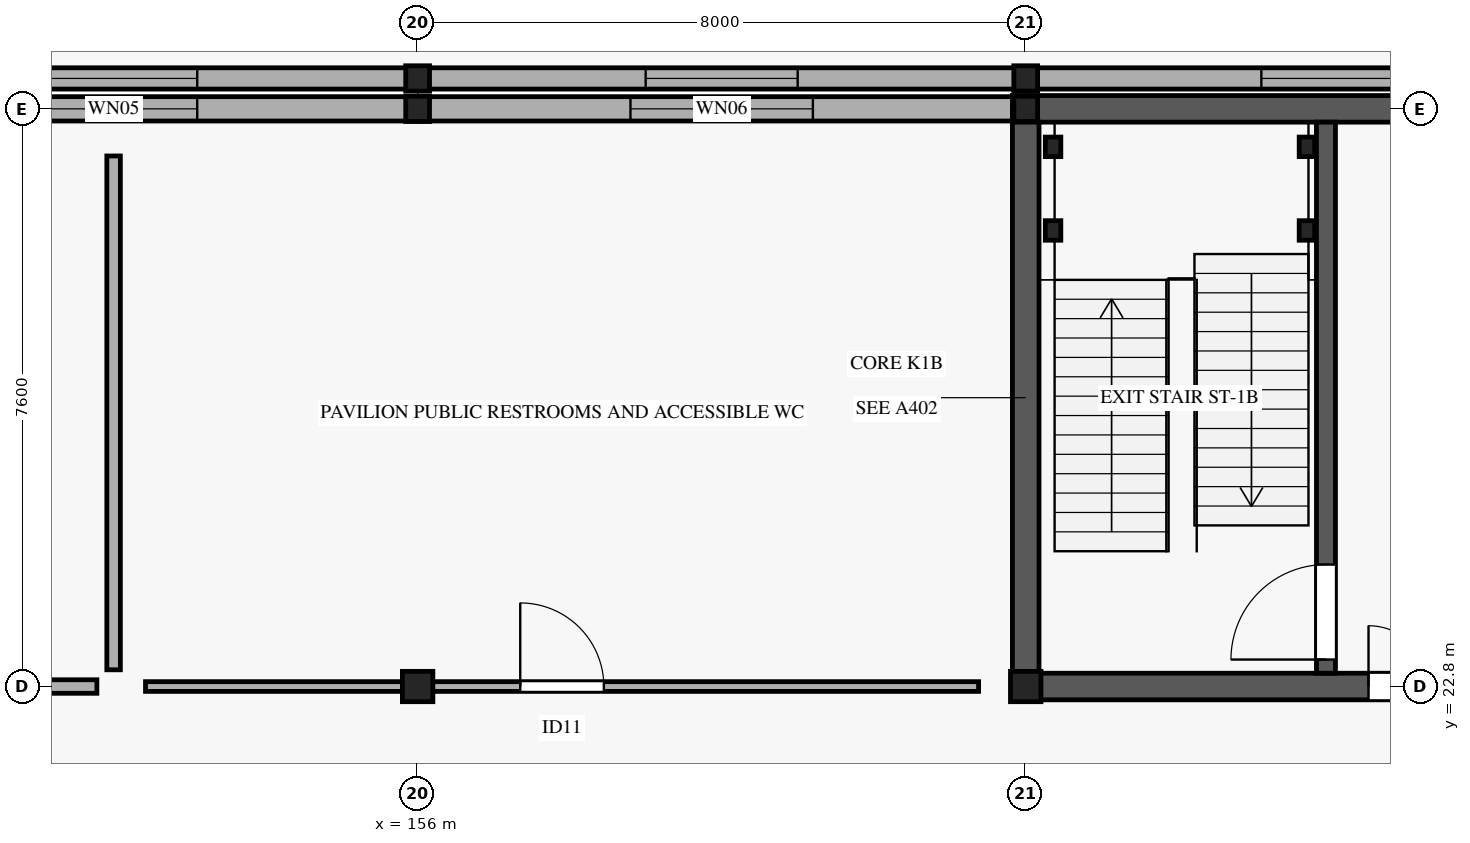
"""IFC4 building model, lengths in metres.
Left out: names, types, materials, properties, quantities, classifications, styles, units other than length and angle.
Written with IfcOpenShell. Run it as: python <this file> out.ifc"""

import sys

from ifc_helpers import new_model, si_unit, direction, frame, frame_2d, origin, origin_2d, place, context, subcontext, project, spatial, rectangle, i_section, extrude, element, fill, save


model = new_model("IFC4")
c1 = context("Model", 3, precision=1e-05, world=origin(), true_north=direction((0.0, 1.0)))
c2 = subcontext(c1, "Body", "Model", "MODEL_VIEW")
j1 = project(units=[si_unit("LENGTHUNIT", "METRE"), si_unit("PLANEANGLEUNIT", "RADIAN")], contexts=[c1])
p1 = place(None, origin())
s1 = spatial("IfcSite", under=j1, at=p1, CompositionType="ELEMENT")
p2 = place(p1, origin())
s2 = spatial("IfcBuilding", under=s1, at=p2, CompositionType="ELEMENT")
p3 = place(p2, origin())
s3 = spatial("IfcBuildingStorey", under=s2, at=p3, CompositionType="ELEMENT", Elevation=0.0)
p4 = place(p3, frame((156.0, 22.8, 0.0), z_axis=(0.0, 0.0, 1.0), x_axis=(1.0, 0.0, 0.0)))
e1 = element("IfcColumn", 1, at=p4, inside=s3, PredefinedType="COLUMN", context=c2, shape_type="SweptSolid", body=[
    extrude(i_section(OverallWidth=0.401, OverallDepth=0.399, WebThickness=0.025, FlangeThickness=0.04, FilletRadius=0.015, at=origin_2d()), origin(), (0.0, 0.0, 1.0), 5.185),
])
p5 = place(p3, frame((156.0, 30.4, 0.0), z_axis=(0.0, 0.0, 1.0), x_axis=(1.0, 0.0, 0.0)))
e2 = element("IfcColumn", 2, at=p5, inside=s3, PredefinedType="COLUMN", context=c2, shape_type="SweptSolid", body=[
    extrude(i_section(OverallWidth=0.313, OverallDepth=0.333, WebThickness=0.018, FlangeThickness=0.028, FilletRadius=0.015, at=origin_2d()), origin(), (0.0, 0.0, 1.0), 5.185),
])
p6 = place(p3, frame((164.0, 22.8, 0.0), z_axis=(0.0, 0.0, 1.0), x_axis=(1.0, 0.0, 0.0)))
e3 = element("IfcColumn", 3, at=p6, inside=s3, PredefinedType="COLUMN", context=c2, shape_type="SweptSolid", body=[
    extrude(i_section(OverallWidth=0.401, OverallDepth=0.399, WebThickness=0.025, FlangeThickness=0.04, FilletRadius=0.015, at=origin_2d()), origin(), (0.0, 0.0, 1.0), 5.185),
])
for number, where, z_axis, x_axis in (
    (4, (164.0, 30.4, 0.0), (0.0, 0.0, 1.0), (1.0, 0.0, 0.0)),
    (5, (156.0, 30.8, 0.0), (0.0, 0.0, 1.0), (1.0, 0.0, 0.0)),
    (6, (164.0, 30.8, 0.0), (0.0, 0.0, 1.0), (1.0, 0.0, 0.0)),
):
    element("IfcColumn", number, at=place(p3, frame(where, z_axis=z_axis, x_axis=x_axis)), inside=s3, PredefinedType="COLUMN", context=c2, shape_type="SweptSolid", body=[
        extrude(i_section(OverallWidth=0.313, OverallDepth=0.333, WebThickness=0.018, FlangeThickness=0.028, FilletRadius=0.015, at=origin_2d()), origin(), (0.0, 0.0, 1.0), 5.185),
    ])
p7 = place(p3, frame((147.98, 30.4, 0.0), z_axis=(0.0, 0.0, 1.0), x_axis=(1.0, 0.0, 0.0)))
e7 = element("IfcWall", 7, at=p7, inside=s3, PredefinedType="STANDARD", context=c2, shape_type="SweptSolid", body=[
    extrude(rectangle(XDim=8.04, YDim=0.32, at=frame_2d((4.02, 0.0))), origin(), (0.0, 0.0, 1.0), 4.25),
])
p8 = place(p7, frame((2.92, 0.0, 0.75)))
e8 = element("IfcOpeningElement", 8, at=p8, cuts=e7, PredefinedType="OPENING", context=c2, shape_type="SweptSolid", body=[
    extrude(rectangle(XDim=2.2, YDim=2.0, at=frame_2d((1.1, 1.0))), frame((0.0, 0.17, 0.0), z_axis=(0.0, -1.0, 0.0), x_axis=(1.0, 0.0, 0.0)), (0.0, 0.0, 1.0), 0.34),
])
p9 = place(p3, frame((155.98, 30.4, 0.0), z_axis=(0.0, 0.0, 1.0), x_axis=(1.0, 0.0, 0.0)))
e9 = element("IfcWall", 9, at=p9, inside=s3, PredefinedType="STANDARD", context=c2, shape_type="SweptSolid", body=[
    extrude(rectangle(XDim=8.04, YDim=0.32, at=frame_2d((4.02, 0.0))), origin(), (0.0, 0.0, 1.0), 4.25),
])
p10 = place(p9, frame((2.82, 0.0, 0.75)))
e10 = element("IfcOpeningElement", 10, at=p10, cuts=e9, PredefinedType="OPENING", context=c2, shape_type="SweptSolid", body=[
    extrude(rectangle(XDim=2.4, YDim=2.0, at=frame_2d((1.2, 1.0))), frame((0.0, 0.17, 0.0), z_axis=(0.0, -1.0, 0.0), x_axis=(1.0, 0.0, 0.0)), (0.0, 0.0, 1.0), 0.34),
])
p11 = place(p3, frame((172.02, 30.8, 0.0), z_axis=(0.0, 0.0, 1.0), x_axis=(-1.0, 0.0, 0.0)))
e11 = element("IfcWall", 11, at=p11, inside=s3, PredefinedType="STANDARD", context=c2, shape_type="SweptSolid", body=[
    extrude(rectangle(XDim=8.04, YDim=0.28, at=frame_2d((4.02, 0.0))), origin(), (0.0, 0.0, 1.0), 4.25),
])
p12 = place(p11, frame((3.12, 0.0, 0.75)))
e12 = element("IfcOpeningElement", 12, at=p12, cuts=e11, PredefinedType="OPENING", context=c2, shape_type="SweptSolid", body=[
    extrude(rectangle(XDim=1.8, YDim=2.0, at=frame_2d((0.9, 1.0))), frame((0.0, 0.15, 0.0), z_axis=(0.0, -1.0, 0.0), x_axis=(1.0, 0.0, 0.0)), (0.0, 0.0, 1.0), 0.3),
])
p13 = place(p3, frame((164.02, 30.8, 0.0), z_axis=(0.0, 0.0, 1.0), x_axis=(-1.0, 0.0, 0.0)))
e13 = element("IfcWall", 13, at=p13, inside=s3, PredefinedType="STANDARD", context=c2, shape_type="SweptSolid", body=[
    extrude(rectangle(XDim=8.04, YDim=0.28, at=frame_2d((4.02, 0.0))), origin(), (0.0, 0.0, 1.0), 4.25),
])
p14 = place(p13, frame((3.02, 0.0, 0.75)))
e14 = element("IfcOpeningElement", 14, at=p14, cuts=e13, PredefinedType="OPENING", context=c2, shape_type="SweptSolid", body=[
    extrude(rectangle(XDim=2.0, YDim=2.0, at=frame_2d((1.0, 1.0))), frame((0.0, 0.15, 0.0), z_axis=(0.0, -1.0, 0.0), x_axis=(1.0, 0.0, 0.0)), (0.0, 0.0, 1.0), 0.3),
])
p15 = place(p3, frame((156.02, 30.8, 0.0), z_axis=(0.0, 0.0, 1.0), x_axis=(-1.0, 0.0, 0.0)))
e15 = element("IfcWall", 15, at=p15, inside=s3, PredefinedType="STANDARD", context=c2, shape_type="SweptSolid", body=[
    extrude(rectangle(XDim=8.04, YDim=0.28, at=frame_2d((4.02, 0.0))), origin(), (0.0, 0.0, 1.0), 4.25),
])
p16 = place(p15, frame((2.92, 0.0, 0.75)))
e16 = element("IfcOpeningElement", 16, at=p16, cuts=e15, PredefinedType="OPENING", context=c2, shape_type="SweptSolid", body=[
    extrude(rectangle(XDim=2.2, YDim=2.0, at=frame_2d((1.1, 1.0))), frame((0.0, 0.15, 0.0), z_axis=(0.0, -1.0, 0.0), x_axis=(1.0, 0.0, 0.0)), (0.0, 0.0, 1.0), 0.3),
])
p17 = place(p3, frame((163.825, 22.8, 0.0), z_axis=(0.0, 0.0, 1.0), x_axis=(1.0, 0.0, 0.0)))
e17 = element("IfcWall", 17, at=p17, inside=s3, PredefinedType="SHEAR", context=c2, shape_type="SweptSolid", body=[
    extrude(rectangle(XDim=8.35, YDim=0.35, at=frame_2d((4.175, 0.0))), origin(), (0.0, 0.0, 1.0), 5.19),
])
p18 = place(p17, frame((4.685, 0.0, 0.0)))
e18 = element("IfcOpeningElement", 18, at=p18, cuts=e17, PredefinedType="OPENING", context=c2, shape_type="SweptSolid", body=[
    extrude(rectangle(XDim=1.6, YDim=2.35, at=frame_2d((0.8, 1.175))), frame((0.0, 0.185, 0.0), z_axis=(0.0, -1.0, 0.0), x_axis=(1.0, 0.0, 0.0)), (0.0, 0.0, 1.0), 0.37),
])
p19 = place(p3, frame((163.825, 30.4, 0.0), z_axis=(0.0, 0.0, 1.0), x_axis=(1.0, 0.0, 0.0)))
e19 = element("IfcWall", 19, at=p19, inside=s3, PredefinedType="SHEAR", context=c2, shape_type="SweptSolid", body=[
    extrude(rectangle(XDim=8.35, YDim=0.35, at=frame_2d((4.175, 0.0))), origin(), (0.0, 0.0, 1.0), 5.19),
])
p20 = place(p3, frame((164.0, 22.975, 0.0), z_axis=(0.0, 0.0, 1.0), x_axis=(0.0, 1.0, 0.0)))
e20 = element("IfcWall", 20, at=p20, inside=s3, PredefinedType="SHEAR", context=c2, shape_type="SweptSolid", body=[
    extrude(rectangle(XDim=7.25, YDim=0.35, at=frame_2d((3.625, 0.0))), origin(), (0.0, 0.0, 1.0), 5.19),
])
p21 = place(p3, frame((167.95, 22.975, 0.0), z_axis=(0.0, 0.0, 1.0), x_axis=(0.0, 1.0, 0.0)))
e21 = element("IfcWall", 21, at=p21, inside=s3, PredefinedType="SHEAR", context=c2, shape_type="SweptSolid", body=[
    extrude(rectangle(XDim=7.25, YDim=0.25, at=frame_2d((3.625, 0.0))), origin(), (0.0, 0.0, 1.0), 5.19),
])
p22 = place(p21, frame((0.18, 0.0, 0.0)))
e22 = element("IfcOpeningElement", 22, at=p22, cuts=e21, PredefinedType="OPENING", context=c2, shape_type="SweptSolid", body=[
    extrude(rectangle(XDim=1.25, YDim=2.2, at=frame_2d((0.625, 1.1))), frame((0.0, 0.135, 0.0), z_axis=(0.0, -1.0, 0.0), x_axis=(1.0, 0.0, 0.0)), (0.0, 0.0, 1.0), 0.27),
])
for number, where, z_axis, x_axis in (
    (23, (164.36, 28.8, -0.23), (0.0, 0.0, 1.0), (1.0, 0.0, 0.0)),
    (24, (167.7, 28.8, -0.23), (0.0, 0.0, 1.0), (1.0, 0.0, 0.0)),
    (25, (164.36, 29.9, -0.23), (0.0, 0.0, 1.0), (1.0, 0.0, 0.0)),
    (26, (167.7, 29.9, -0.23), (0.0, 0.0, 1.0), (1.0, 0.0, 0.0)),
):
    element("IfcColumn", number, at=place(p3, frame(where, z_axis=z_axis, x_axis=x_axis)), inside=s3, PredefinedType="COLUMN", context=c2, shape_type="SweptSolid", body=[
        extrude(i_section(OverallWidth=0.204, OverallDepth=0.257, WebThickness=0.009, FlangeThickness=0.016, FilletRadius=0.013, at=origin_2d()), origin(), (0.0, 0.0, 1.0), 5.625),
    ])
p23 = place(p3, frame((132.62, 22.8, 0.0), z_axis=(0.0, 0.0, 1.0), x_axis=(1.0, 0.0, 0.0)))
e27 = element("IfcWall", 27, at=p23, inside=s3, PredefinedType="PARTITIONING", context=c2, shape_type="SweptSolid", body=[
    extrude(rectangle(XDim=19.16, YDim=0.178, at=frame_2d((9.58, 0.0))), origin(), (0.0, 0.0, 1.0), 4.05),
])
p24 = place(p23, frame((9.055, 0.0, 0.0)))
e28 = element("IfcOpeningElement", 28, at=p24, cuts=e27, PredefinedType="OPENING", context=c2, shape_type="SweptSolid", body=[
    extrude(rectangle(XDim=1.05, YDim=2.15, at=frame_2d((0.525, 1.075))), frame((0.0, 0.099, 0.0), z_axis=(0.0, -1.0, 0.0), x_axis=(1.0, 0.0, 0.0)), (0.0, 0.0, 1.0), 0.198),
])
p25 = place(p3, frame((152.0, 23.02, 0.0), z_axis=(0.0, 0.0, 1.0), x_axis=(0.0, 1.0, 0.0)))
e29 = element("IfcWall", 29, at=p25, inside=s3, PredefinedType="PARTITIONING", context=c2, shape_type="SweptSolid", body=[
    extrude(rectangle(XDim=6.76, YDim=0.178, at=frame_2d((3.38, 0.0))), origin(), (0.0, 0.0, 1.0), 4.05),
])
p26 = place(p3, frame((152.42, 22.8, 0.0), z_axis=(0.0, 0.0, 1.0), x_axis=(1.0, 0.0, 0.0)))
e30 = element("IfcWall", 30, at=p26, inside=s3, PredefinedType="PARTITIONING", context=c2, shape_type="SweptSolid", body=[
    extrude(rectangle(XDim=10.96, YDim=0.128, at=frame_2d((5.48, 0.0))), origin(), (0.0, 0.0, 1.0), 4.05),
])
p27 = place(p26, frame((4.93, 0.0, 0.0)))
e31 = element("IfcOpeningElement", 31, at=p27, cuts=e30, PredefinedType="OPENING", context=c2, shape_type="SweptSolid", body=[
    extrude(rectangle(XDim=1.1, YDim=2.3, at=frame_2d((0.55, 1.15))), frame((0.0, 0.074, 0.0), z_axis=(0.0, -1.0, 0.0), x_axis=(1.0, 0.0, 0.0)), (0.0, 0.0, 1.0), 0.148),
])
p28 = place(p8, origin())
e32 = element("IfcWindow", 32, at=p28, inside=s3, PartitioningType="SINGLE_PANEL", PredefinedType="WINDOW", context=c2, shape_type="SweptSolid", body=[
    extrude(rectangle(XDim=2.2, YDim=2.0, at=frame_2d((1.1, 1.0))), frame((0.0, 0.03, 0.0), z_axis=(0.0, -1.0, 0.0), x_axis=(1.0, 0.0, 0.0)), (0.0, 0.0, 1.0), 0.06),
])
fill(e8, e32)
p29 = place(p10, origin())
e33 = element("IfcWindow", 33, at=p29, inside=s3, PartitioningType="SINGLE_PANEL", PredefinedType="WINDOW", context=c2, shape_type="SweptSolid", body=[
    extrude(rectangle(XDim=2.4, YDim=2.0, at=frame_2d((1.2, 1.0))), frame((0.0, 0.03, 0.0), z_axis=(0.0, -1.0, 0.0), x_axis=(1.0, 0.0, 0.0)), (0.0, 0.0, 1.0), 0.06),
])
fill(e10, e33)
p30 = place(p12, origin())
e34 = element("IfcWindow", 34, at=p30, inside=s3, PartitioningType="SINGLE_PANEL", PredefinedType="WINDOW", context=c2, shape_type="SweptSolid", body=[
    extrude(rectangle(XDim=1.8, YDim=2.0, at=frame_2d((0.9, 1.0))), frame((0.0, 0.03, 0.0), z_axis=(0.0, -1.0, 0.0), x_axis=(1.0, 0.0, 0.0)), (0.0, 0.0, 1.0), 0.06),
])
fill(e12, e34)
p31 = place(p14, origin())
e35 = element("IfcWindow", 35, at=p31, inside=s3, PartitioningType="SINGLE_PANEL", PredefinedType="WINDOW", context=c2, shape_type="SweptSolid", body=[
    extrude(rectangle(XDim=2.0, YDim=2.0, at=frame_2d((1.0, 1.0))), frame((0.0, 0.03, 0.0), z_axis=(0.0, -1.0, 0.0), x_axis=(1.0, 0.0, 0.0)), (0.0, 0.0, 1.0), 0.06),
])
fill(e14, e35)
p32 = place(p16, origin())
e36 = element("IfcWindow", 36, at=p32, inside=s3, PartitioningType="SINGLE_PANEL", PredefinedType="WINDOW", context=c2, shape_type="SweptSolid", body=[
    extrude(rectangle(XDim=2.2, YDim=2.0, at=frame_2d((1.1, 1.0))), frame((0.0, 0.03, 0.0), z_axis=(0.0, -1.0, 0.0), x_axis=(1.0, 0.0, 0.0)), (0.0, 0.0, 1.0), 0.06),
])
fill(e16, e36)
p33 = place(p22, origin())
e37 = element("IfcDoor", 37, at=p33, inside=s3, OperationType="SINGLE_SWING_LEFT", PredefinedType="DOOR", context=c2, shape_type="SweptSolid", body=[
    extrude(rectangle(XDim=1.25, YDim=2.2, at=frame_2d((0.625, 1.1))), frame((0.0, 0.025, 0.0), z_axis=(0.0, -1.0, 0.0), x_axis=(1.0, 0.0, 0.0)), (0.0, 0.0, 1.0), 0.05),
])
fill(e22, e37)
p34 = place(p18, origin())
e38 = element("IfcDoor", 38, at=p34, inside=s3, OperationType="DOUBLE_DOOR_SINGLE_SWING", PredefinedType="DOOR", context=c2, shape_type="SweptSolid", body=[
    extrude(rectangle(XDim=1.6, YDim=2.35, at=frame_2d((0.8, 1.175))), frame((0.0, 0.025, 0.0), z_axis=(0.0, -1.0, 0.0), x_axis=(1.0, 0.0, 0.0)), (0.0, 0.0, 1.0), 0.05),
])
fill(e18, e38)
p35 = place(p27, origin())
e39 = element("IfcDoor", 39, at=p35, inside=s3, OperationType="SINGLE_SWING_LEFT", PredefinedType="DOOR", context=c2, shape_type="SweptSolid", body=[
    extrude(rectangle(XDim=1.1, YDim=2.3, at=frame_2d((0.55, 1.15))), frame((0.0, 0.025, 0.0), z_axis=(0.0, -1.0, 0.0), x_axis=(1.0, 0.0, 0.0)), (0.0, 0.0, 1.0), 0.05),
])
fill(e31, e39)
save(model, sys.argv[1])
